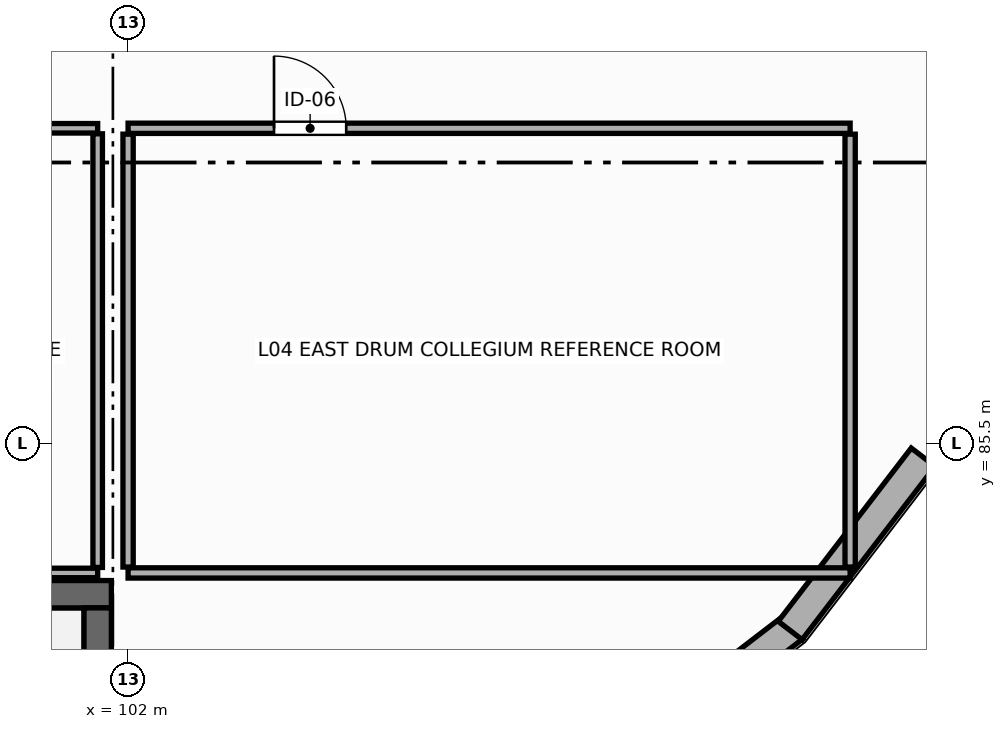
"""IFC4 building model, lengths in metres.
Left out: names, types, materials, properties, quantities, classifications, styles, units other than length and angle.
Written with IfcOpenShell. Run it as: python <this file> out.ifc"""

import sys

from ifc_helpers import new_model, si_unit, direction, frame, frame_2d, origin, place, context, subcontext, project, spatial, rectangle, extrude, element, fill, save


model = new_model("IFC4")
c1 = context("Model", 3, precision=1e-05, world=origin(), true_north=direction((0.0, 1.0)))
c2 = subcontext(c1, "Body", "Model", "MODEL_VIEW")
j1 = project(units=[si_unit("LENGTHUNIT", "METRE"), si_unit("PLANEANGLEUNIT", "RADIAN")], contexts=[c1])
p1 = place(None, origin())
s1 = spatial("IfcSite", under=j1, at=p1, CompositionType="ELEMENT")
p2 = place(p1, origin())
s2 = spatial("IfcBuilding", under=s1, at=p2, CompositionType="ELEMENT")
p3 = place(p2, frame((0.0, 0.0, 14.4)))
s3 = spatial("IfcBuildingStorey", under=s2, at=p3, CompositionType="ELEMENT", Elevation=14.4)
p4 = place(p3, frame((108.477, 81.339, 0.0), z_axis=(0.0, 0.0, 1.0), x_axis=(0.793346533164, 0.608770300127, 0.0)))
e1 = element("IfcWall", 1, at=p4, inside=s3, PredefinedType="ELEMENTEDWALL", context=c2, shape_type="SweptSolid", body=[
    extrude(rectangle(XDim=2.874, YDim=0.395, at=frame_2d((1.437, 0.0))), origin(), (0.0, 0.0, 1.0), 2.99),
])
p5 = place(p4, frame((1.037, 0.0, 0.85)))
e2 = element("IfcOpeningElement", 2, at=p5, cuts=e1, PredefinedType="OPENING", context=c2, shape_type="SweptSolid", body=[
    extrude(rectangle(XDim=0.8, YDim=1.7, at=frame_2d((0.4, 0.85))), frame((0.0, 0.208, 0.0), z_axis=(0.0, -1.0, 0.0), x_axis=(1.0, 0.0, 0.0)), (0.0, 0.0, 1.0), 0.415),
])
p6 = place(p3, frame((110.711, 83.042, 0.0), z_axis=(0.0, 0.0, 1.0), x_axis=(0.608729278603, 0.79337800913, 0.0)))
e3 = element("IfcWall", 3, at=p6, inside=s3, PredefinedType="ELEMENTEDWALL", context=c2, shape_type="SweptSolid", body=[
    extrude(rectangle(XDim=2.875, YDim=0.395, at=frame_2d((1.437, 0.0))), origin(), (0.0, 0.0, 1.0), 3.09),
])
p7 = place(p3, frame((92.42, 83.52, 0.0), z_axis=(0.0, 0.0, 1.0), x_axis=(1.0, 0.0, 0.0)))
e4 = element("IfcWall", 4, at=p7, inside=s3, PredefinedType="SHEAR", context=c2, shape_type="SweptSolid", body=[
    extrude(rectangle(XDim=9.36, YDim=0.36, at=frame_2d((4.68, 0.0))), origin(), (0.0, 0.0, 1.0), 3.96),
])
p8 = place(p3, frame((101.6, 83.34, 0.0), z_axis=(0.0, 0.0, 1.0), x_axis=(0.0, -1.0, 0.0)))
e5 = element("IfcWall", 5, at=p8, inside=s3, PredefinedType="SHEAR", context=c2, shape_type="SweptSolid", body=[
    extrude(rectangle(XDim=3.36, YDim=0.36, at=frame_2d((1.68, 0.0))), origin(), (0.0, 0.0, 1.0), 3.96),
])
p9 = place(p3, frame((99.1, 89.65, 0.0), z_axis=(0.0, 0.0, 1.0), x_axis=(1.0, 0.0, 0.0)))
e6 = element("IfcWall", 6, at=p9, inside=s3, PredefinedType="PARTITIONING", context=c2, shape_type="SweptSolid", body=[
    extrude(rectangle(XDim=2.5, YDim=0.125, at=frame_2d((1.25, 0.0))), origin(), (0.0, 0.0, 1.0), 3.09),
])
p10 = place(p9, frame((0.75, 0.0, 0.0)))
e7 = element("IfcOpeningElement", 7, at=p10, cuts=e6, PredefinedType="OPENING", context=c2, shape_type="SweptSolid", body=[
    extrude(rectangle(XDim=1.0, YDim=2.1, at=frame_2d((0.5, 1.05))), frame((0.0, 0.073, 0.0), z_axis=(0.0, -1.0, 0.0), x_axis=(1.0, 0.0, 0.0)), (0.0, 0.0, 1.0), 0.145),
])
p11 = place(p3, frame((101.6, 83.8, 0.0), z_axis=(0.0, 0.0, 1.0), x_axis=(-1.0, 0.0, 0.0)))
e8 = element("IfcWall", 8, at=p11, inside=s3, PredefinedType="PARTITIONING", context=c2, shape_type="SweptSolid", body=[
    extrude(rectangle(XDim=2.5, YDim=0.125, at=frame_2d((1.25, 0.0))), origin(), (0.0, 0.0, 1.0), 3.09),
])
p12 = place(p3, frame((101.6, 89.577, 0.0), z_axis=(0.0, 0.0, 1.0), x_axis=(0.0, -1.0, 0.0)))
e9 = element("IfcWall", 9, at=p12, inside=s3, PredefinedType="PARTITIONING", context=c2, shape_type="SweptSolid", body=[
    extrude(rectangle(XDim=5.705, YDim=0.125, at=frame_2d((2.853, 0.0))), origin(), (0.0, 0.0, 1.0), 3.09),
])
p13 = place(p3, frame((102.0, 89.65, 0.0), z_axis=(0.0, 0.0, 1.0), x_axis=(1.0, 0.0, 0.0)))
e10 = element("IfcWall", 10, at=p13, inside=s3, PredefinedType="PARTITIONING", context=c2, shape_type="SweptSolid", body=[
    extrude(rectangle(XDim=9.5, YDim=0.135, at=frame_2d((4.75, 0.0))), origin(), (0.0, 0.0, 1.0), 2.99),
])
p14 = place(p13, frame((1.92, 0.0, 0.0)))
e11 = element("IfcOpeningElement", 11, at=p14, cuts=e10, PredefinedType="OPENING", context=c2, shape_type="SweptSolid", body=[
    extrude(rectangle(XDim=0.95, YDim=2.15, at=frame_2d((0.475, 1.075))), frame((0.0, 0.077, 0.0), z_axis=(0.0, -1.0, 0.0), x_axis=(1.0, 0.0, 0.0)), (0.0, 0.0, 1.0), 0.155),
])
p15 = place(p3, frame((111.5, 83.8, 0.0), z_axis=(0.0, 0.0, 1.0), x_axis=(-1.0, 0.0, 0.0)))
e12 = element("IfcWall", 12, at=p15, inside=s3, PredefinedType="PARTITIONING", context=c2, shape_type="SweptSolid", body=[
    extrude(rectangle(XDim=9.5, YDim=0.135, at=frame_2d((4.75, 0.0))), origin(), (0.0, 0.0, 1.0), 2.99),
])
p16 = place(p3, frame((102.0, 83.877, 0.0), z_axis=(0.0, 0.0, 1.0), x_axis=(0.0, 1.0, 0.0)))
e13 = element("IfcWall", 13, at=p16, inside=s3, PredefinedType="PARTITIONING", context=c2, shape_type="SweptSolid", body=[
    extrude(rectangle(XDim=5.695, YDim=0.135, at=frame_2d((2.848, 0.0))), origin(), (0.0, 0.0, 1.0), 3.09),
])
p17 = place(p3, frame((111.5, 89.573, 0.0), z_axis=(0.0, 0.0, 1.0), x_axis=(0.0, -1.0, 0.0)))
e14 = element("IfcWall", 14, at=p17, inside=s3, PredefinedType="PARTITIONING", context=c2, shape_type="SweptSolid", body=[
    extrude(rectangle(XDim=5.695, YDim=0.135, at=frame_2d((2.848, 0.0))), origin(), (0.0, 0.0, 1.0), 3.59),
])
p18 = place(p14, origin())
e15 = element("IfcDoor", 15, at=p18, inside=s3, OperationType="SINGLE_SWING_LEFT", PredefinedType="DOOR", context=c2, shape_type="SweptSolid", body=[
    extrude(rectangle(XDim=0.95, YDim=2.15, at=frame_2d((0.475, 1.075))), frame((0.0, 0.025, 0.0), z_axis=(0.0, -1.0, 0.0), x_axis=(1.0, 0.0, 0.0)), (0.0, 0.0, 1.0), 0.05),
])
fill(e11, e15)
save(model, sys.argv[1])
